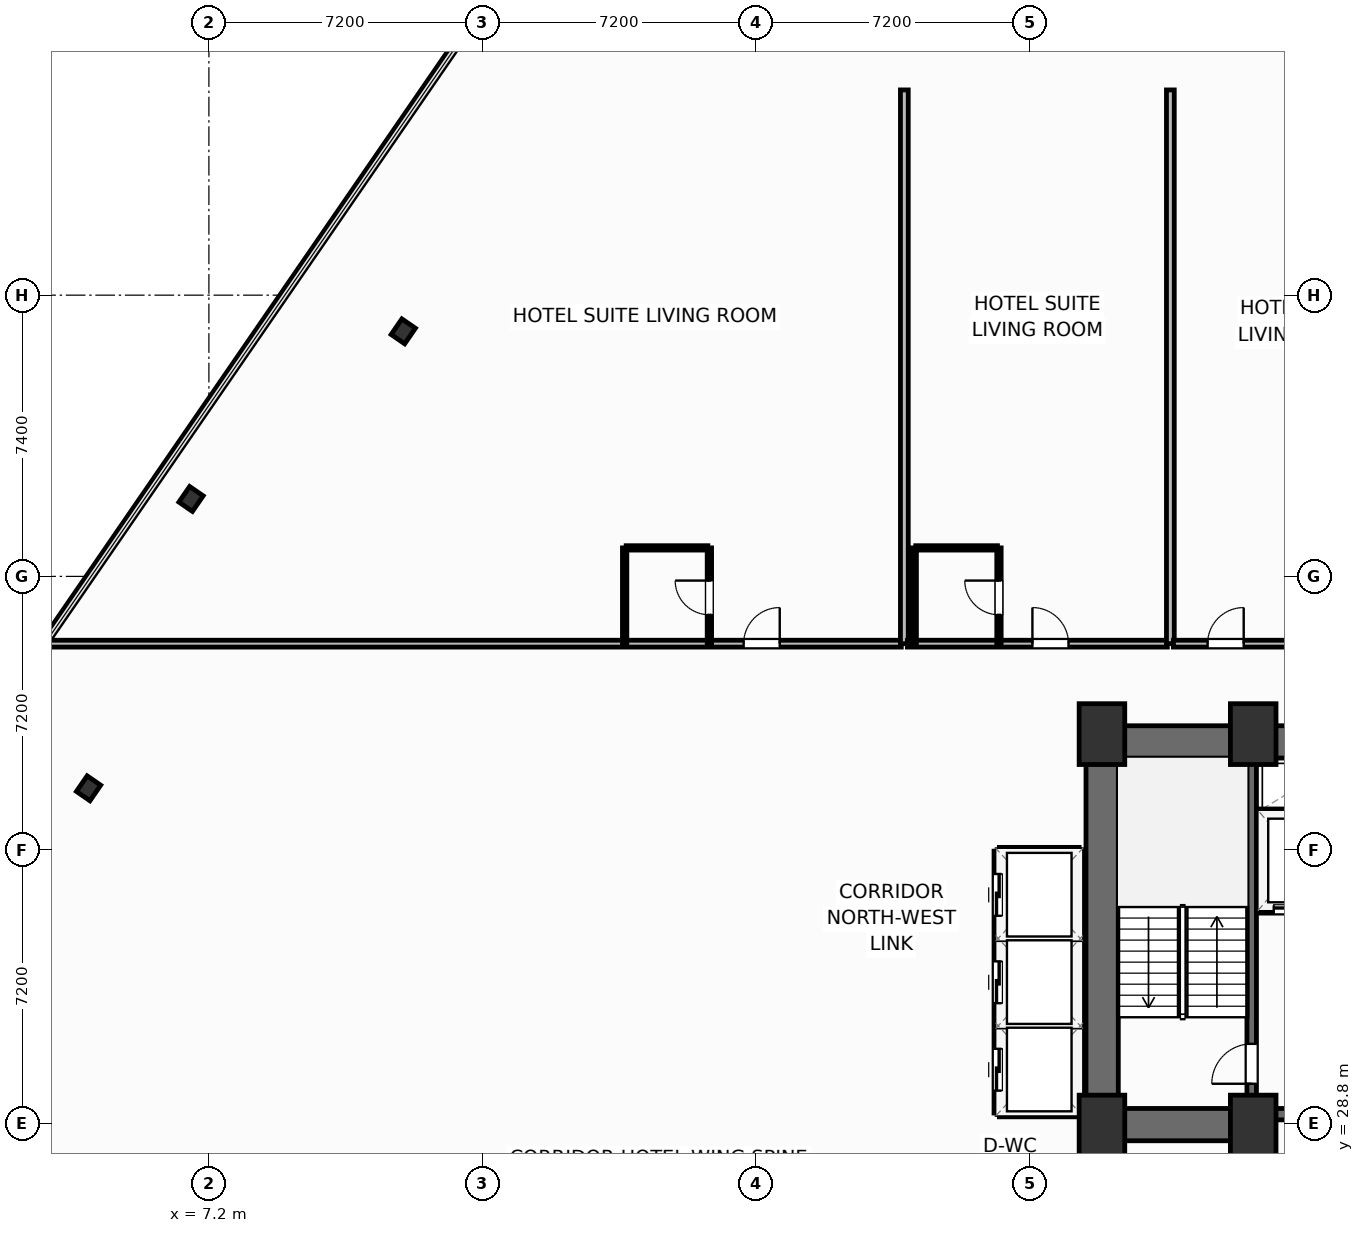
"""IFC4 building model, lengths in metres.
Left out: names, types, materials, properties, quantities, classifications, styles, units other than length and angle.
Written with IfcOpenShell. Run it as: python <this file> out.ifc"""

import sys

from ifc_helpers import new_model, si_unit, direction, frame, frame_2d, origin, origin_2d, place, context, subcontext, project, spatial, rectangle, i_section, extrude, element, fill, save


model = new_model("IFC4")
c1 = context("Model", 3, precision=1e-05, world=origin(), true_north=direction((0.0, 1.0)))
c2 = subcontext(c1, "Body", "Model", "MODEL_VIEW")
j1 = project(units=[si_unit("LENGTHUNIT", "METRE"), si_unit("PLANEANGLEUNIT", "RADIAN")], contexts=[c1])
p1 = place(None, origin())
s1 = spatial("IfcSite", under=j1, at=p1, CompositionType="ELEMENT")
p2 = place(p1, origin())
s2 = spatial("IfcBuilding", under=s1, at=p2, CompositionType="ELEMENT")
p3 = place(p2, frame((0.0, 0.0, 27.0)))
s3 = spatial("IfcBuildingStorey", under=s2, at=p3, CompositionType="ELEMENT", Elevation=27.0)
for number, where, z_axis, x_axis in (
    (1, (30.7, 28.75, 0.0), (0.0, 0.0, 1.0), (1.0, 0.0, 0.0)),
    (2, (34.68, 28.75, 0.0), (0.0, 0.0, 1.0), (1.0, 0.0, 0.0)),
    (3, (30.7, 39.05, 0.0), (0.0, 0.0, 1.0), (1.0, 0.0, 0.0)),
    (4, (34.68, 39.05, 0.0), (0.0, 0.0, 1.0), (1.0, 0.0, 0.0)),
):
    element("IfcColumn", number, at=place(p3, frame(where, z_axis=z_axis, x_axis=x_axis)), inside=s3, PredefinedType="COLUMN", context=c2, shape_type="SweptSolid", body=[
        extrude(rectangle(XDim=1.2, YDim=1.6, at=origin_2d()), origin(), (0.0, 0.0, 1.0), 3.7),
    ])
p4 = place(p3, frame((30.28, 38.845, 0.0), z_axis=(0.0, 0.0, 1.0), x_axis=(1.0, 0.0, 0.0)))
e5 = element("IfcWall", 5, at=p4, inside=s3, PredefinedType="SHEAR", context=c2, shape_type="SweptSolid", body=[
    extrude(rectangle(XDim=17.84, YDim=0.85, at=frame_2d((8.92, 0.0))), origin(), (0.0, 0.0, 1.0), 3.45),
])
p5 = place(p3, frame((30.705, 29.2, 0.0), z_axis=(0.0, 0.0, 1.0), x_axis=(0.0, 1.0, 0.0)))
e6 = element("IfcWall", 6, at=p5, inside=s3, PredefinedType="SHEAR", context=c2, shape_type="SweptSolid", body=[
    extrude(rectangle(XDim=9.22, YDim=0.85, at=frame_2d((4.61, 0.0))), origin(), (0.0, 0.0, 1.0), 3.45),
])
p6 = place(p3, frame((30.28, 28.775, 0.0), z_axis=(0.0, 0.0, 1.0), x_axis=(1.0, 0.0, 0.0)))
e7 = element("IfcWall", 7, at=p6, inside=s3, PredefinedType="SHEAR", context=c2, shape_type="SweptSolid", body=[
    extrude(rectangle(XDim=4.52, YDim=0.85, at=frame_2d((2.26, 0.0))), origin(), (0.0, 0.0, 1.0), 3.45),
])
p7 = place(p3, frame((34.8, 29.05, 0.0), z_axis=(0.0, 0.0, 1.0), x_axis=(1.0, 0.0, 0.0)))
e8 = element("IfcWall", 8, at=p7, inside=s3, PredefinedType="SHEAR", context=c2, shape_type="SweptSolid", body=[
    extrude(rectangle(XDim=8.8, YDim=0.3, at=frame_2d((4.4, 0.0))), origin(), (0.0, 0.0, 1.0), 3.45),
])
p8 = place(p7, frame((0.95, 0.0, 0.0)))
e9 = element("IfcOpeningElement", 9, at=p8, cuts=e8, PredefinedType="OPENING", context=c2, shape_type="SweptSolid", body=[
    extrude(rectangle(XDim=1.1, YDim=2.15, at=frame_2d((0.55, 1.075))), frame((0.0, 0.16, 0.0), z_axis=(0.0, -1.0, 0.0), x_axis=(1.0, 0.0, 0.0)), (0.0, 0.0, 1.0), 0.32),
])
p9 = place(p7, frame((6.75, 0.0, 0.0)))
e10 = element("IfcOpeningElement", 10, at=p9, cuts=e8, PredefinedType="OPENING", context=c2, shape_type="SweptSolid", body=[
    extrude(rectangle(XDim=1.1, YDim=2.15, at=frame_2d((0.55, 1.075))), frame((0.0, 0.16, 0.0), z_axis=(0.0, -1.0, 0.0), x_axis=(1.0, 0.0, 0.0)), (0.0, 0.0, 1.0), 0.32),
])
p10 = place(p7, frame((3.32, 0.0, 0.0)))
e11 = element("IfcOpeningElement", 11, at=p10, cuts=e8, PredefinedType="OPENING", context=c2, shape_type="SweptSolid", body=[
    extrude(rectangle(XDim=0.95, YDim=2.15, at=frame_2d((0.475, 1.075))), frame((0.0, 0.16, 0.0), z_axis=(0.0, -1.0, 0.0), x_axis=(1.0, 0.0, 0.0)), (0.0, 0.0, 1.0), 0.32),
])
p11 = place(p3, frame((34.64, 29.2, 0.0), z_axis=(0.0, 0.0, 1.0), x_axis=(0.0, 1.0, 0.0)))
e12 = element("IfcWall", 12, at=p11, inside=s3, PredefinedType="SHEAR", context=c2, shape_type="SweptSolid", body=[
    extrude(rectangle(XDim=9.22, YDim=0.25, at=frame_2d((4.61, 0.0))), origin(), (0.0, 0.0, 1.0), 3.45),
])
p12 = place(p11, frame((0.65, 0.0, 0.0)))
e13 = element("IfcOpeningElement", 13, at=p12, cuts=e12, PredefinedType="OPENING", context=c2, shape_type="SweptSolid", body=[
    extrude(rectangle(XDim=1.05, YDim=2.15, at=frame_2d((0.525, 1.075))), frame((0.0, 0.135, 0.0), z_axis=(0.0, -1.0, 0.0), x_axis=(1.0, 0.0, 0.0)), (0.0, 0.0, 1.0), 0.27),
])
for number, where, z_axis, x_axis in (
    (14, (12.315, 49.647, -0.25), (0.0, 0.0, 1.0), (0.824, -0.567, 0.0)),
    (15, (6.73, 45.238, -0.25), (0.0, 0.0, 1.0), (0.824, -0.567, 0.0)),
    (16, (4.033, 37.624, -0.25), (0.0, 0.0, 1.0), (0.824, -0.567, 0.0)),
):
    element("IfcColumn", number, at=place(p3, frame(where, z_axis=z_axis, x_axis=x_axis)), inside=s3, PredefinedType="COLUMN", context=c2, shape_type="SweptSolid", body=[
        extrude(i_section(OverallWidth=0.432, OverallDepth=0.498, WebThickness=0.056, FlangeThickness=0.089, FilletRadius=0.025, at=origin_2d()), origin(), (0.0, 0.0, 1.0), 3.95),
    ])
p13 = place(p3, frame((44.882, 51.962, 0.0), z_axis=(0.0, 0.0, 1.0), x_axis=(-0.823534427573, 0.567266292497, 0.0)))
e17 = element("IfcWall", 17, at=p13, inside=s3, PredefinedType="SOLIDWALL", context=c2, shape_type="SweptSolid", body=[
    extrude(rectangle(XDim=23.147, YDim=0.22, at=frame_2d((11.574, 0.0))), origin(), (0.0, 0.0, 1.0), 2.73),
])
p14 = place(p13, frame((10.749, 0.0, 0.8)))
e18 = element("IfcOpeningElement", 18, at=p14, cuts=e17, PredefinedType="OPENING", context=c2, shape_type="SweptSolid", body=[
    extrude(rectangle(XDim=1.65, YDim=1.65, at=frame_2d((0.825, 0.825))), frame((0.0, 0.12, 0.0), z_axis=(0.0, -1.0, 0.0), x_axis=(1.0, 0.0, 0.0)), (0.0, 0.0, 1.0), 0.24),
])
p15 = place(p3, frame((2.921, 41.43, 0.0), z_axis=(0.0, 0.0, 1.0), x_axis=(1.0, 0.0, 0.0)))
e19 = element("IfcWall", 19, at=p15, inside=s3, PredefinedType="PARTITIONING", context=c2, shape_type="SweptSolid", body=[
    extrude(rectangle(XDim=22.499, YDim=0.18, at=frame_2d((11.25, 0.0))), origin(), (0.0, 0.0, 1.0), 3.45),
])
p16 = place(p15, frame((18.35, 0.0, 0.0)))
e20 = element("IfcOpeningElement", 20, at=p16, cuts=e19, PredefinedType="OPENING", context=c2, shape_type="SweptSolid", body=[
    extrude(rectangle(XDim=0.95, YDim=2.15, at=frame_2d((0.475, 1.075))), frame((0.0, 0.1, 0.0), z_axis=(0.0, -1.0, 0.0), x_axis=(1.0, 0.0, 0.0)), (0.0, 0.0, 1.0), 0.2),
])
p17 = place(p3, frame((18.18, 43.95, 0.0), z_axis=(0.0, 0.0, 1.0), x_axis=(1.0, 0.0, 0.0)))
e21 = element("IfcWall", 21, at=p17, inside=s3, PredefinedType="PARTITIONING", context=c2, shape_type="SweptSolid", body=[
    extrude(rectangle(XDim=2.15, YDim=0.115, at=frame_2d((1.075, 0.0))), origin(), (0.0, 0.0, 1.0), 3.45),
])
p18 = place(p3, frame((20.37, 41.43, 0.0), z_axis=(0.0, 0.0, 1.0), x_axis=(0.0, 1.0, 0.0)))
e22 = element("IfcWall", 22, at=p18, inside=s3, PredefinedType="PARTITIONING", context=c2, shape_type="SweptSolid", body=[
    extrude(rectangle(XDim=2.52, YDim=0.115, at=frame_2d((1.26, 0.0))), origin(), (0.0, 0.0, 1.0), 3.45),
])
p19 = place(p18, frame((0.76, 0.0, 0.0)))
e23 = element("IfcOpeningElement", 23, at=p19, cuts=e22, PredefinedType="OPENING", context=c2, shape_type="SweptSolid", body=[
    extrude(rectangle(XDim=0.9, YDim=2.05, at=frame_2d((0.45, 1.025))), frame((0.0, 0.067, 0.0), z_axis=(0.0, -1.0, 0.0), x_axis=(1.0, 0.0, 0.0)), (0.0, 0.0, 1.0), 0.135),
])
p20 = place(p3, frame((18.14, 41.43, 0.0), z_axis=(0.0, 0.0, 1.0), x_axis=(0.0, 1.0, 0.0)))
e24 = element("IfcWall", 24, at=p20, inside=s3, PredefinedType="PARTITIONING", context=c2, shape_type="SweptSolid", body=[
    extrude(rectangle(XDim=2.52, YDim=0.115, at=frame_2d((1.26, 0.0))), origin(), (0.0, 0.0, 1.0), 3.45),
])
p21 = place(p3, frame((25.5, 41.43, 0.0), z_axis=(0.0, 0.0, 1.0), x_axis=(0.0, 1.0, 0.0)))
e25 = element("IfcWall", 25, at=p21, inside=s3, PredefinedType="PARTITIONING", context=c2, shape_type="SweptSolid", body=[
    extrude(rectangle(XDim=14.57, YDim=0.205, at=frame_2d((7.285, 0.0))), origin(), (0.0, 0.0, 1.0), 3.45),
])
p22 = place(p3, frame((25.58, 41.43, 0.0), z_axis=(0.0, 0.0, 1.0), x_axis=(1.0, 0.0, 0.0)))
e26 = element("IfcWall", 26, at=p22, inside=s3, PredefinedType="PARTITIONING", context=c2, shape_type="SweptSolid", body=[
    extrude(rectangle(XDim=6.84, YDim=0.18, at=frame_2d((3.42, 0.0))), origin(), (0.0, 0.0, 1.0), 3.45),
])
p23 = place(p22, frame((3.29, 0.0, 0.0)))
e27 = element("IfcOpeningElement", 27, at=p23, cuts=e26, PredefinedType="OPENING", context=c2, shape_type="SweptSolid", body=[
    extrude(rectangle(XDim=0.95, YDim=2.15, at=frame_2d((0.475, 1.075))), frame((0.0, 0.1, 0.0), z_axis=(0.0, -1.0, 0.0), x_axis=(1.0, 0.0, 0.0)), (0.0, 0.0, 1.0), 0.2),
])
p24 = place(p3, frame((25.8, 43.95, 0.0), z_axis=(0.0, 0.0, 1.0), x_axis=(1.0, 0.0, 0.0)))
e28 = element("IfcWall", 28, at=p24, inside=s3, PredefinedType="PARTITIONING", context=c2, shape_type="SweptSolid", body=[
    extrude(rectangle(XDim=2.15, YDim=0.115, at=frame_2d((1.075, 0.0))), origin(), (0.0, 0.0, 1.0), 3.45),
])
p25 = place(p3, frame((27.99, 41.43, 0.0), z_axis=(0.0, 0.0, 1.0), x_axis=(0.0, 1.0, 0.0)))
e29 = element("IfcWall", 29, at=p25, inside=s3, PredefinedType="PARTITIONING", context=c2, shape_type="SweptSolid", body=[
    extrude(rectangle(XDim=2.52, YDim=0.115, at=frame_2d((1.26, 0.0))), origin(), (0.0, 0.0, 1.0), 3.45),
])
p26 = place(p25, frame((0.76, 0.0, 0.0)))
e30 = element("IfcOpeningElement", 30, at=p26, cuts=e29, PredefinedType="OPENING", context=c2, shape_type="SweptSolid", body=[
    extrude(rectangle(XDim=0.9, YDim=2.05, at=frame_2d((0.45, 1.025))), frame((0.0, 0.067, 0.0), z_axis=(0.0, -1.0, 0.0), x_axis=(1.0, 0.0, 0.0)), (0.0, 0.0, 1.0), 0.135),
])
p27 = place(p3, frame((25.76, 41.43, 0.0), z_axis=(0.0, 0.0, 1.0), x_axis=(0.0, 1.0, 0.0)))
e31 = element("IfcWall", 31, at=p27, inside=s3, PredefinedType="PARTITIONING", context=c2, shape_type="SweptSolid", body=[
    extrude(rectangle(XDim=2.52, YDim=0.115, at=frame_2d((1.26, 0.0))), origin(), (0.0, 0.0, 1.0), 3.45),
])
p28 = place(p3, frame((32.5, 41.43, 0.0), z_axis=(0.0, 0.0, 1.0), x_axis=(0.0, 1.0, 0.0)))
e32 = element("IfcWall", 32, at=p28, inside=s3, PredefinedType="PARTITIONING", context=c2, shape_type="SweptSolid", body=[
    extrude(rectangle(XDim=14.57, YDim=0.205, at=frame_2d((7.285, 0.0))), origin(), (0.0, 0.0, 1.0), 3.45),
])
p29 = place(p3, frame((32.58, 41.43, 0.0), z_axis=(0.0, 0.0, 1.0), x_axis=(1.0, 0.0, 0.0)))
e33 = element("IfcWall", 33, at=p29, inside=s3, PredefinedType="PARTITIONING", context=c2, shape_type="SweptSolid", body=[
    extrude(rectangle(XDim=6.84, YDim=0.18, at=frame_2d((3.42, 0.0))), origin(), (0.0, 0.0, 1.0), 3.45),
])
p30 = place(p29, frame((0.9, 0.0, 0.0)))
e34 = element("IfcOpeningElement", 34, at=p30, cuts=e33, PredefinedType="OPENING", context=c2, shape_type="SweptSolid", body=[
    extrude(rectangle(XDim=0.95, YDim=2.15, at=frame_2d((0.475, 1.075))), frame((0.0, 0.1, 0.0), z_axis=(0.0, -1.0, 0.0), x_axis=(1.0, 0.0, 0.0)), (0.0, 0.0, 1.0), 0.2),
])
p31 = place(p3, frame((34.8, 34.44, 0.0), z_axis=(0.0, 0.0, 1.0), x_axis=(1.0, 0.0, 0.0)))
e35 = element("IfcWall", 35, at=p31, inside=s3, PredefinedType="PARTITIONING", context=c2, shape_type="SweptSolid", body=[
    extrude(rectangle(XDim=2.18, YDim=0.2, at=frame_2d((1.09, 0.0))), origin(), (0.0, 0.0, 1.0), 3.45),
])
p32 = place(p31, frame((0.42, 0.0, 0.0)))
e36 = element("IfcOpeningElement", 36, at=p32, cuts=e35, PredefinedType="OPENING", context=c2, shape_type="SweptSolid", body=[
    extrude(rectangle(XDim=1.2, YDim=2.2, at=frame_2d((0.6, 1.1))), frame((0.0, 0.11, 0.0), z_axis=(0.0, -1.0, 0.0), x_axis=(1.0, 0.0, 0.0)), (0.0, 0.0, 1.0), 0.22),
])
p33 = place(p3, frame((34.8, 36.98, 0.0), z_axis=(0.0, 0.0, 1.0), x_axis=(1.0, 0.0, 0.0)))
e37 = element("IfcWall", 37, at=p33, inside=s3, PredefinedType="PARTITIONING", context=c2, shape_type="SweptSolid", body=[
    extrude(rectangle(XDim=2.18, YDim=0.2, at=frame_2d((1.09, 0.0))), origin(), (0.0, 0.0, 1.0), 3.45),
])
for number, where, z_axis, x_axis in (
    (38, (28.02, 31.375, 0.0), (0.0, 0.0, 1.0), (1.0, 0.0, 0.0)),
    (39, (28.02, 33.675, 0.0), (0.0, 0.0, 1.0), (1.0, 0.0, 0.0)),
):
    element("IfcWall", number, at=place(p3, frame(where, z_axis=z_axis, x_axis=x_axis)), inside=s3, PredefinedType="PARTITIONING", context=c2, shape_type="SweptSolid", body=[
        extrude(rectangle(XDim=2.06, YDim=0.2, at=frame_2d((1.03, 0.0))), origin(), (0.0, 0.0, 1.0), 3.45),
    ])
for number, where, z_axis, x_axis in (
    (40, (28.0, 29.08, 0.0), (0.0, 0.0, 1.0), (1.0, 0.0, 0.0)),
    (41, (28.0, 35.97, 0.0), (0.0, 0.0, 1.0), (1.0, 0.0, 0.0)),
):
    element("IfcWall", number, at=place(p3, frame(where, z_axis=z_axis, x_axis=x_axis)), inside=s3, PredefinedType="PARTITIONING", context=c2, shape_type="SweptSolid", body=[
        extrude(rectangle(XDim=2.1, YDim=0.2, at=frame_2d((1.05, 0.0))), origin(), (0.0, 0.0, 1.0), 3.45),
    ])
p34 = place(p3, frame((30.12, 29.08, 0.0), z_axis=(0.0, 0.0, 1.0), x_axis=(0.0, 1.0, 0.0)))
e42 = element("IfcWall", 42, at=p34, inside=s3, PredefinedType="PARTITIONING", context=c2, shape_type="SweptSolid", body=[
    extrude(rectangle(XDim=6.89, YDim=0.2, at=frame_2d((3.445, 0.0))), origin(), (0.0, 0.0, 1.0), 3.45),
])
p35 = place(p3, frame((27.96, 29.08, 0.0), z_axis=(0.0, 0.0, 1.0), x_axis=(0.0, 1.0, 0.0)))
e43 = element("IfcWall", 43, at=p35, inside=s3, PredefinedType="PARTITIONING", context=c2, shape_type="SweptSolid", body=[
    extrude(rectangle(XDim=6.89, YDim=0.2, at=frame_2d((3.445, 0.0))), origin(), (0.0, 0.0, 1.0), 3.45),
])
p36 = place(p35, frame((0.59, 0.0, 0.0)))
e44 = element("IfcOpeningElement", 44, at=p36, cuts=e43, PredefinedType="OPENING", context=c2, shape_type="SweptSolid", body=[
    extrude(rectangle(XDim=1.1, YDim=2.15, at=frame_2d((0.55, 1.075))), frame((0.0, 0.11, 0.0), z_axis=(0.0, -1.0, 0.0), x_axis=(1.0, 0.0, 0.0)), (0.0, 0.0, 1.0), 0.22),
])
p37 = place(p35, frame((2.89, 0.0, 0.0)))
e45 = element("IfcOpeningElement", 45, at=p37, cuts=e43, PredefinedType="OPENING", context=c2, shape_type="SweptSolid", body=[
    extrude(rectangle(XDim=1.1, YDim=2.15, at=frame_2d((0.55, 1.075))), frame((0.0, 0.11, 0.0), z_axis=(0.0, -1.0, 0.0), x_axis=(1.0, 0.0, 0.0)), (0.0, 0.0, 1.0), 0.22),
])
p38 = place(p35, frame((5.19, 0.0, 0.0)))
e46 = element("IfcOpeningElement", 46, at=p38, cuts=e43, PredefinedType="OPENING", context=c2, shape_type="SweptSolid", body=[
    extrude(rectangle(XDim=1.1, YDim=2.15, at=frame_2d((0.55, 1.075))), frame((0.0, 0.11, 0.0), z_axis=(0.0, -1.0, 0.0), x_axis=(1.0, 0.0, 0.0)), (0.0, 0.0, 1.0), 0.22),
])
p39 = place(p16, origin())
e47 = element("IfcDoor", 47, at=p39, inside=s3, OperationType="SINGLE_SWING_RIGHT", PredefinedType="DOOR", context=c2, shape_type="SweptSolid", body=[
    extrude(rectangle(XDim=0.95, YDim=2.15, at=frame_2d((0.475, 1.075))), frame((0.0, 0.025, 0.0), z_axis=(0.0, -1.0, 0.0), x_axis=(1.0, 0.0, 0.0)), (0.0, 0.0, 1.0), 0.05),
])
fill(e20, e47)
p40 = place(p19, origin())
e48 = element("IfcDoor", 48, at=p40, inside=s3, OperationType="SINGLE_SWING_RIGHT", PredefinedType="DOOR", context=c2, shape_type="SweptSolid", body=[
    extrude(rectangle(XDim=0.9, YDim=2.05, at=frame_2d((0.45, 1.025))), frame((0.0, 0.025, 0.0), z_axis=(0.0, -1.0, 0.0), x_axis=(1.0, 0.0, 0.0)), (0.0, 0.0, 1.0), 0.05),
])
fill(e23, e48)
p41 = place(p23, origin())
e49 = element("IfcDoor", 49, at=p41, inside=s3, OperationType="SINGLE_SWING_LEFT", PredefinedType="DOOR", context=c2, shape_type="SweptSolid", body=[
    extrude(rectangle(XDim=0.95, YDim=2.15, at=frame_2d((0.475, 1.075))), frame((0.0, 0.025, 0.0), z_axis=(0.0, -1.0, 0.0), x_axis=(1.0, 0.0, 0.0)), (0.0, 0.0, 1.0), 0.05),
])
fill(e27, e49)
p42 = place(p26, origin())
e50 = element("IfcDoor", 50, at=p42, inside=s3, OperationType="SINGLE_SWING_RIGHT", PredefinedType="DOOR", context=c2, shape_type="SweptSolid", body=[
    extrude(rectangle(XDim=0.9, YDim=2.05, at=frame_2d((0.45, 1.025))), frame((0.0, 0.025, 0.0), z_axis=(0.0, -1.0, 0.0), x_axis=(1.0, 0.0, 0.0)), (0.0, 0.0, 1.0), 0.05),
])
fill(e30, e50)
p43 = place(p30, origin())
e51 = element("IfcDoor", 51, at=p43, inside=s3, OperationType="SINGLE_SWING_RIGHT", PredefinedType="DOOR", context=c2, shape_type="SweptSolid", body=[
    extrude(rectangle(XDim=0.95, YDim=2.15, at=frame_2d((0.475, 1.075))), frame((0.0, 0.025, 0.0), z_axis=(0.0, -1.0, 0.0), x_axis=(1.0, 0.0, 0.0)), (0.0, 0.0, 1.0), 0.05),
])
fill(e34, e51)
p44 = place(p12, origin())
e52 = element("IfcDoor", 52, at=p44, inside=s3, OperationType="SINGLE_SWING_LEFT", PredefinedType="DOOR", context=c2, shape_type="SweptSolid", body=[
    extrude(rectangle(XDim=1.05, YDim=2.15, at=frame_2d((0.525, 1.075))), frame((0.0, 0.025, 0.0), z_axis=(0.0, -1.0, 0.0), x_axis=(1.0, 0.0, 0.0)), (0.0, 0.0, 1.0), 0.05),
])
fill(e13, e52)
p45 = place(p32, origin())
e53 = element("IfcDoor", 53, at=p45, inside=s3, OperationType="SLIDING_TO_LEFT", PredefinedType="DOOR", context=c2, shape_type="SweptSolid", body=[
    extrude(rectangle(XDim=1.2, YDim=2.2, at=frame_2d((0.6, 1.1))), frame((0.0, 0.025, 0.0), z_axis=(0.0, -1.0, 0.0), x_axis=(1.0, 0.0, 0.0)), (0.0, 0.0, 1.0), 0.05),
])
fill(e36, e53)
p46 = place(p36, origin())
e54 = element("IfcDoor", 54, at=p46, inside=s3, OperationType="SLIDING_TO_LEFT", PredefinedType="DOOR", context=c2, shape_type="SweptSolid", body=[
    extrude(rectangle(XDim=1.1, YDim=2.15, at=frame_2d((0.55, 1.075))), frame((0.0, 0.025, 0.0), z_axis=(0.0, -1.0, 0.0), x_axis=(1.0, 0.0, 0.0)), (0.0, 0.0, 1.0), 0.05),
])
fill(e44, e54)
p47 = place(p37, origin())
e55 = element("IfcDoor", 55, at=p47, inside=s3, OperationType="SLIDING_TO_LEFT", PredefinedType="DOOR", context=c2, shape_type="SweptSolid", body=[
    extrude(rectangle(XDim=1.1, YDim=2.15, at=frame_2d((0.55, 1.075))), frame((0.0, 0.025, 0.0), z_axis=(0.0, -1.0, 0.0), x_axis=(1.0, 0.0, 0.0)), (0.0, 0.0, 1.0), 0.05),
])
fill(e45, e55)
p48 = place(p38, origin())
e56 = element("IfcDoor", 56, at=p48, inside=s3, OperationType="SLIDING_TO_LEFT", PredefinedType="DOOR", context=c2, shape_type="SweptSolid", body=[
    extrude(rectangle(XDim=1.1, YDim=2.15, at=frame_2d((0.55, 1.075))), frame((0.0, 0.025, 0.0), z_axis=(0.0, -1.0, 0.0), x_axis=(1.0, 0.0, 0.0)), (0.0, 0.0, 1.0), 0.05),
])
fill(e46, e56)
save(model, sys.argv[1])
